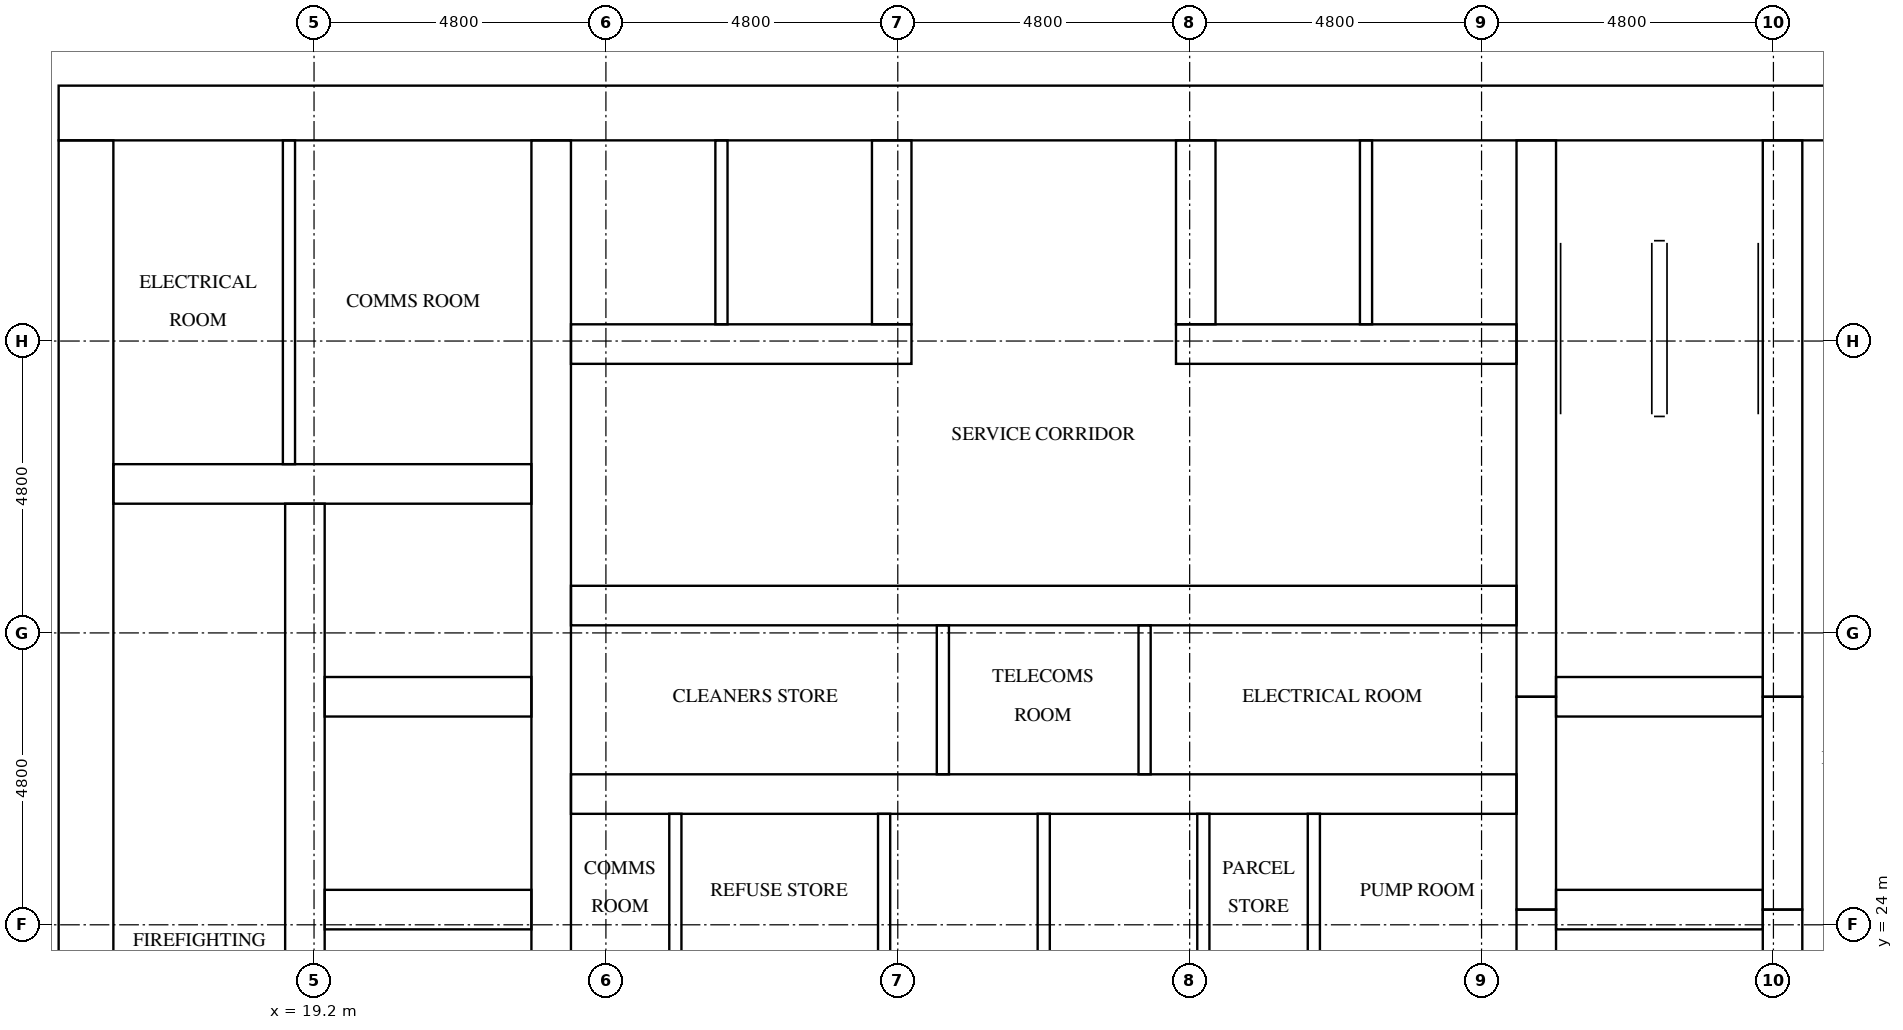
"""IFC4 building model, lengths in metres.
Left out: names, types, materials, properties, quantities, classifications, styles, units other than length and angle.
Written with IfcOpenShell. Run it as: python <this file> out.ifc"""

import sys

from ifc_helpers import new_model, si_unit, direction, frame, frame_2d, origin, place, context, subcontext, project, spatial, rectangle, extrude, element, fill, save


model = new_model("IFC4")
c1 = context("Model", 3, precision=1e-05, world=origin(), true_north=direction((0.0, 1.0)))
c2 = subcontext(c1, "Body", "Model", "MODEL_VIEW")
j1 = project(units=[si_unit("LENGTHUNIT", "METRE"), si_unit("PLANEANGLEUNIT", "RADIAN")], contexts=[c1])
p1 = place(None, origin())
s1 = spatial("IfcSite", under=j1, at=p1, CompositionType="ELEMENT")
p2 = place(p1, origin())
s2 = spatial("IfcBuilding", under=s1, at=p2, CompositionType="ELEMENT")
p3 = place(p2, frame((0.0, 0.0, 99.7)))
s3 = spatial("IfcBuildingStorey", under=s2, at=p3, CompositionType="ELEMENT", Elevation=99.7)
p4 = place(p3, frame((15.0, 37.35, 0.0), z_axis=(0.0, 0.0, 1.0), x_axis=(1.0, 0.0, 0.0)))
e1 = element("IfcWall", 1, at=p4, inside=s3, PredefinedType="SHEAR", context=c2, shape_type="SweptSolid", body=[
    extrude(rectangle(XDim=32.4, YDim=0.9, at=frame_2d((16.2, 0.0))), origin(), (0.0, 0.0, 1.0), 3.2),
])
p5 = place(p4, frame((15.3, 0.0, 0.0)))
e2 = element("IfcOpeningElement", 2, at=p5, cuts=e1, PredefinedType="OPENING", context=c2, shape_type="SweptSolid", body=[
    extrude(rectangle(XDim=1.8, YDim=2.1, at=frame_2d((0.9, 1.05))), frame((0.0, 0.46, 0.0), z_axis=(0.0, -1.0, 0.0), x_axis=(1.0, 0.0, 0.0)), (0.0, 0.0, 1.0), 0.92),
])
p6 = place(p4, frame((1.794, 0.0, 0.0)))
e3 = element("IfcOpeningElement", 3, at=p6, cuts=e1, PredefinedType="OPENING", context=c2, shape_type="SweptSolid", body=[
    extrude(rectangle(XDim=1.0, YDim=2.1, at=frame_2d((0.5, 1.05))), frame((0.0, 0.46, 0.0), z_axis=(0.0, -1.0, 0.0), x_axis=(1.0, 0.0, 0.0)), (0.0, 0.0, 1.0), 0.92),
])
p7 = place(p4, frame((5.331, 0.0, 0.0)))
e4 = element("IfcOpeningElement", 4, at=p7, cuts=e1, PredefinedType="OPENING", context=c2, shape_type="SweptSolid", body=[
    extrude(rectangle(XDim=1.0, YDim=2.1, at=frame_2d((0.5, 1.05))), frame((0.0, 0.46, 0.0), z_axis=(0.0, -1.0, 0.0), x_axis=(1.0, 0.0, 0.0)), (0.0, 0.0, 1.0), 0.92),
])
p8 = place(p3, frame((15.45, 15.9, 0.0), z_axis=(0.0, 0.0, 1.0), x_axis=(0.0, 1.0, 0.0)))
e5 = element("IfcWall", 5, at=p8, inside=s3, PredefinedType="SHEAR", context=c2, shape_type="SweptSolid", body=[
    extrude(rectangle(XDim=21.0, YDim=0.9, at=frame_2d((10.5, 0.0))), origin(), (0.0, 0.0, 1.0), 3.2),
])
p9 = place(p8, frame((4.86, 0.0, 0.0)))
e6 = element("IfcOpeningElement", 6, at=p9, cuts=e5, PredefinedType="OPENING", context=c2, shape_type="SweptSolid", body=[
    extrude(rectangle(XDim=1.2, YDim=2.1, at=frame_2d((0.6, 1.05))), frame((0.0, 0.46, 0.0), z_axis=(0.0, -1.0, 0.0), x_axis=(1.0, 0.0, 0.0)), (0.0, 0.0, 1.0), 0.92),
])
p10 = place(p3, frame((19.05, 15.9, 0.0), z_axis=(0.0, 0.0, 1.0), x_axis=(0.0, 1.0, 0.0)))
e7 = element("IfcWall", 7, at=p10, inside=s3, PredefinedType="SHEAR", context=c2, shape_type="SweptSolid", body=[
    extrude(rectangle(XDim=15.025, YDim=0.65, at=frame_2d((7.513, 0.0))), origin(), (0.0, 0.0, 1.0), 3.2),
])
p11 = place(p10, frame((9.55, 0.0, 0.0)))
e8 = element("IfcOpeningElement", 8, at=p11, cuts=e7, PredefinedType="OPENING", context=c2, shape_type="SweptSolid", body=[
    extrude(rectangle(XDim=1.1, YDim=2.1, at=frame_2d((0.55, 1.05))), frame((0.0, 0.335, 0.0), z_axis=(0.0, -1.0, 0.0), x_axis=(1.0, 0.0, 0.0)), (0.0, 0.0, 1.0), 0.67),
])
p12 = place(p10, frame((13.05, 0.0, 0.0)))
e9 = element("IfcOpeningElement", 9, at=p12, cuts=e7, PredefinedType="OPENING", context=c2, shape_type="SweptSolid", body=[
    extrude(rectangle(XDim=1.1, YDim=2.1, at=frame_2d((0.55, 1.05))), frame((0.0, 0.335, 0.0), z_axis=(0.0, -1.0, 0.0), x_axis=(1.0, 0.0, 0.0)), (0.0, 0.0, 1.0), 0.67),
])
p13 = place(p10, frame((0.3, 0.0, 0.0)))
e10 = element("IfcOpeningElement", 10, at=p13, cuts=e7, PredefinedType="OPENING", context=c2, shape_type="SweptSolid", body=[
    extrude(rectangle(XDim=1.2, YDim=2.1, at=frame_2d((0.6, 1.05))), frame((0.0, 0.335, 0.0), z_axis=(0.0, -1.0, 0.0), x_axis=(1.0, 0.0, 0.0)), (0.0, 0.0, 1.0), 0.67),
])
p14 = place(p3, frame((23.1, 15.9, 0.0), z_axis=(0.0, 0.0, 1.0), x_axis=(0.0, 1.0, 0.0)))
e11 = element("IfcWall", 11, at=p14, inside=s3, PredefinedType="SHEAR", context=c2, shape_type="SweptSolid", body=[
    extrude(rectangle(XDim=21.0, YDim=0.65, at=frame_2d((10.5, 0.0))), origin(), (0.0, 0.0, 1.0), 3.2),
])
p15 = place(p3, frame((39.3, 15.9, 0.0), z_axis=(0.0, 0.0, 1.0), x_axis=(0.0, 1.0, 0.0)))
e12 = element("IfcWall", 12, at=p15, inside=s3, PredefinedType="SHEAR", context=c2, shape_type="SweptSolid", body=[
    extrude(rectangle(XDim=8.35, YDim=0.65, at=frame_2d((4.175, 0.0))), origin(), (0.0, 0.0, 1.0), 3.2),
])
p16 = place(p3, frame((39.3, 24.25, 0.0), z_axis=(0.0, 0.0, 1.0), x_axis=(0.0, 1.0, 0.0)))
e13 = element("IfcWall", 13, at=p16, inside=s3, PredefinedType="SHEAR", context=c2, shape_type="SweptSolid", body=[
    extrude(rectangle(XDim=3.5, YDim=0.65, at=frame_2d((1.75, 0.0))), origin(), (0.0, 0.0, 1.0), 3.2),
])
p17 = place(p3, frame((39.3, 27.75, 0.0), z_axis=(0.0, 0.0, 1.0), x_axis=(0.0, 1.0, 0.0)))
e14 = element("IfcWall", 14, at=p17, inside=s3, PredefinedType="SHEAR", context=c2, shape_type="SweptSolid", body=[
    extrude(rectangle(XDim=9.15, YDim=0.65, at=frame_2d((4.575, 0.0))), origin(), (0.0, 0.0, 1.0), 3.2),
])
p18 = place(p3, frame((43.35, 15.9, 0.0), z_axis=(0.0, 0.0, 1.0), x_axis=(0.0, 1.0, 0.0)))
e15 = element("IfcWall", 15, at=p18, inside=s3, PredefinedType="SHEAR", context=c2, shape_type="SweptSolid", body=[
    extrude(rectangle(XDim=8.35, YDim=0.65, at=frame_2d((4.175, 0.0))), origin(), (0.0, 0.0, 1.0), 3.2),
])
p19 = place(p18, frame((0.3, 0.0, 0.0)))
e16 = element("IfcOpeningElement", 16, at=p19, cuts=e15, PredefinedType="OPENING", context=c2, shape_type="SweptSolid", body=[
    extrude(rectangle(XDim=1.2, YDim=2.1, at=frame_2d((0.6, 1.05))), frame((0.0, 0.335, 0.0), z_axis=(0.0, -1.0, 0.0), x_axis=(1.0, 0.0, 0.0)), (0.0, 0.0, 1.0), 0.67),
])
p20 = place(p3, frame((43.35, 24.25, 0.0), z_axis=(0.0, 0.0, 1.0), x_axis=(0.0, 1.0, 0.0)))
e17 = element("IfcWall", 17, at=p20, inside=s3, PredefinedType="SHEAR", context=c2, shape_type="SweptSolid", body=[
    extrude(rectangle(XDim=3.5, YDim=0.65, at=frame_2d((1.75, 0.0))), origin(), (0.0, 0.0, 1.0), 3.2),
])
p21 = place(p20, frame((1.2, 0.0, 0.0)))
e18 = element("IfcOpeningElement", 18, at=p21, cuts=e17, PredefinedType="OPENING", context=c2, shape_type="SweptSolid", body=[
    extrude(rectangle(XDim=1.1, YDim=2.1, at=frame_2d((0.55, 1.05))), frame((0.0, 0.335, 0.0), z_axis=(0.0, -1.0, 0.0), x_axis=(1.0, 0.0, 0.0)), (0.0, 0.0, 1.0), 0.67),
])
p22 = place(p3, frame((43.35, 27.75, 0.0), z_axis=(0.0, 0.0, 1.0), x_axis=(0.0, 1.0, 0.0)))
e19 = element("IfcWall", 19, at=p22, inside=s3, PredefinedType="SHEAR", context=c2, shape_type="SweptSolid", body=[
    extrude(rectangle(XDim=9.15, YDim=0.65, at=frame_2d((4.575, 0.0))), origin(), (0.0, 0.0, 1.0), 3.2),
])
p23 = place(p22, frame((7.65, 0.0, 0.0)))
e20 = element("IfcOpeningElement", 20, at=p23, cuts=e19, PredefinedType="OPENING", context=c2, shape_type="SweptSolid", body=[
    extrude(rectangle(XDim=1.2, YDim=2.1, at=frame_2d((0.6, 1.05))), frame((0.0, 0.335, 0.0), z_axis=(0.0, -1.0, 0.0), x_axis=(1.0, 0.0, 0.0)), (0.0, 0.0, 1.0), 0.67),
])
for number, where, z_axis, x_axis in (
    (21, (19.375, 24.25, 0.0), (0.0, 0.0, 1.0), (1.0, 0.0, 0.0)),
    (22, (19.375, 27.75, 0.0), (0.0, 0.0, 1.0), (1.0, 0.0, 0.0)),
):
    element("IfcWall", number, at=place(p3, frame(where, z_axis=z_axis, x_axis=x_axis)), inside=s3, PredefinedType="SHEAR", context=c2, shape_type="SweptSolid", body=[
        extrude(rectangle(XDim=3.4, YDim=0.65, at=frame_2d((1.7, 0.0))), origin(), (0.0, 0.0, 1.0), 3.2),
    ])
p24 = place(p3, frame((15.9, 31.25, 0.0), z_axis=(0.0, 0.0, 1.0), x_axis=(1.0, 0.0, 0.0)))
e23 = element("IfcWall", 23, at=p24, inside=s3, PredefinedType="SHEAR", context=c2, shape_type="SweptSolid", body=[
    extrude(rectangle(XDim=6.875, YDim=0.65, at=frame_2d((3.438, 0.0))), origin(), (0.0, 0.0, 1.0), 3.2),
])
for number, where, z_axis, x_axis in (
    (24, (39.625, 24.25, 0.0), (0.0, 0.0, 1.0), (1.0, 0.0, 0.0)),
    (25, (39.625, 27.75, 0.0), (0.0, 0.0, 1.0), (1.0, 0.0, 0.0)),
):
    element("IfcWall", number, at=place(p3, frame(where, z_axis=z_axis, x_axis=x_axis)), inside=s3, PredefinedType="SHEAR", context=c2, shape_type="SweptSolid", body=[
        extrude(rectangle(XDim=3.4, YDim=0.65, at=frame_2d((1.7, 0.0))), origin(), (0.0, 0.0, 1.0), 3.2),
    ])
p25 = place(p3, frame((23.425, 26.15, 0.0), z_axis=(0.0, 0.0, 1.0), x_axis=(1.0, 0.0, 0.0)))
e26 = element("IfcWall", 26, at=p25, inside=s3, PredefinedType="SHEAR", context=c2, shape_type="SweptSolid", body=[
    extrude(rectangle(XDim=15.55, YDim=0.65, at=frame_2d((7.775, 0.0))), origin(), (0.0, 0.0, 1.0), 3.2),
])
p26 = place(p3, frame((23.425, 29.25, 0.0), z_axis=(0.0, 0.0, 1.0), x_axis=(1.0, 0.0, 0.0)))
e27 = element("IfcWall", 27, at=p26, inside=s3, PredefinedType="SHEAR", context=c2, shape_type="SweptSolid", body=[
    extrude(rectangle(XDim=15.55, YDim=0.65, at=frame_2d((7.775, 0.0))), origin(), (0.0, 0.0, 1.0), 3.2),
])
p27 = place(p26, frame((2.508, 0.0, 0.0)))
e28 = element("IfcOpeningElement", 28, at=p27, cuts=e27, PredefinedType="OPENING", context=c2, shape_type="SweptSolid", body=[
    extrude(rectangle(XDim=1.0, YDim=2.1, at=frame_2d((0.5, 1.05))), frame((0.0, 0.335, 0.0), z_axis=(0.0, -1.0, 0.0), x_axis=(1.0, 0.0, 0.0)), (0.0, 0.0, 1.0), 0.67),
])
p28 = place(p26, frame((7.275, 0.0, 0.0)))
e29 = element("IfcOpeningElement", 29, at=p28, cuts=e27, PredefinedType="OPENING", context=c2, shape_type="SweptSolid", body=[
    extrude(rectangle(XDim=1.0, YDim=2.1, at=frame_2d((0.5, 1.05))), frame((0.0, 0.335, 0.0), z_axis=(0.0, -1.0, 0.0), x_axis=(1.0, 0.0, 0.0)), (0.0, 0.0, 1.0), 0.67),
])
p29 = place(p26, frame((12.042, 0.0, 0.0)))
e30 = element("IfcOpeningElement", 30, at=p29, cuts=e27, PredefinedType="OPENING", context=c2, shape_type="SweptSolid", body=[
    extrude(rectangle(XDim=1.0, YDim=2.1, at=frame_2d((0.5, 1.05))), frame((0.0, 0.335, 0.0), z_axis=(0.0, -1.0, 0.0), x_axis=(1.0, 0.0, 0.0)), (0.0, 0.0, 1.0), 0.67),
])
p30 = place(p3, frame((23.425, 33.55, 0.0), z_axis=(0.0, 0.0, 1.0), x_axis=(1.0, 0.0, 0.0)))
e31 = element("IfcWall", 31, at=p30, inside=s3, PredefinedType="SHEAR", context=c2, shape_type="SweptSolid", body=[
    extrude(rectangle(XDim=5.6, YDim=0.65, at=frame_2d((2.8, 0.0))), origin(), (0.0, 0.0, 1.0), 3.2),
])
p31 = place(p3, frame((33.375, 33.55, 0.0), z_axis=(0.0, 0.0, 1.0), x_axis=(1.0, 0.0, 0.0)))
e32 = element("IfcWall", 32, at=p31, inside=s3, PredefinedType="SHEAR", context=c2, shape_type="SweptSolid", body=[
    extrude(rectangle(XDim=5.6, YDim=0.65, at=frame_2d((2.8, 0.0))), origin(), (0.0, 0.0, 1.0), 3.2),
])
for number, where, z_axis, x_axis in (
    (33, (28.7, 33.875, 0.0), (0.0, 0.0, 1.0), (0.0, 1.0, 0.0)),
    (34, (33.7, 33.875, 0.0), (0.0, 0.0, 1.0), (0.0, 1.0, 0.0)),
):
    element("IfcWall", number, at=place(p3, frame(where, z_axis=z_axis, x_axis=x_axis)), inside=s3, PredefinedType="SHEAR", context=c2, shape_type="SweptSolid", body=[
        extrude(rectangle(XDim=3.025, YDim=0.65, at=frame_2d((1.512, 0.0))), origin(), (0.0, 0.0, 1.0), 3.2),
    ])
for number, where, z_axis, x_axis in (
    (35, (28.575, 23.375, 0.0), (0.0, 0.0, 1.0), (0.0, 1.0, 0.0)),
    (36, (31.2, 23.375, 0.0), (0.0, 0.0, 1.0), (0.0, 1.0, 0.0)),
    (37, (33.825, 23.375, 0.0), (0.0, 0.0, 1.0), (0.0, 1.0, 0.0)),
):
    element("IfcWall", number, at=place(p3, frame(where, z_axis=z_axis, x_axis=x_axis)), inside=s3, PredefinedType="SOLIDWALL", context=c2, shape_type="SweptSolid", body=[
        extrude(rectangle(XDim=2.45, YDim=0.2, at=frame_2d((1.225, 0.0))), origin(), (0.0, 0.0, 1.0), 3.2),
    ])
for number, where, z_axis, x_axis in (
    (38, (25.9, 33.875, 0.0), (0.0, 0.0, 1.0), (0.0, 1.0, 0.0)),
    (39, (36.5, 33.875, 0.0), (0.0, 0.0, 1.0), (0.0, 1.0, 0.0)),
):
    element("IfcWall", number, at=place(p3, frame(where, z_axis=z_axis, x_axis=x_axis)), inside=s3, PredefinedType="SOLIDWALL", context=c2, shape_type="SweptSolid", body=[
        extrude(rectangle(XDim=3.025, YDim=0.2, at=frame_2d((1.512, 0.0))), origin(), (0.0, 0.0, 1.0), 3.2),
    ])
p32 = place(p3, frame((18.788, 31.575, 0.0), z_axis=(0.0, 0.0, 1.0), x_axis=(0.0, 1.0, 0.0)))
e40 = element("IfcWall", 40, at=p32, inside=s3, PredefinedType="PARTITIONING", context=c2, shape_type="SweptSolid", body=[
    extrude(rectangle(XDim=5.325, YDim=0.2, at=frame_2d((2.663, 0.0))), origin(), (0.0, 0.0, 1.0), 3.2),
])
for number, where, z_axis, x_axis in (
    (41, (25.142, 23.375, 0.0), (0.0, 0.0, 1.0), (0.0, 1.0, 0.0)),
    (42, (35.642, 23.375, 0.0), (0.0, 0.0, 1.0), (0.0, 1.0, 0.0)),
    (43, (29.541, 26.475, 0.0), (0.0, 0.0, 1.0), (0.0, 1.0, 0.0)),
    (44, (32.859, 26.475, 0.0), (0.0, 0.0, 1.0), (0.0, 1.0, 0.0)),
):
    element("IfcWall", number, at=place(p3, frame(where, z_axis=z_axis, x_axis=x_axis)), inside=s3, PredefinedType="PARTITIONING", context=c2, shape_type="SweptSolid", body=[
        extrude(rectangle(XDim=2.45, YDim=0.2, at=frame_2d((1.225, 0.0))), origin(), (0.0, 0.0, 1.0), 3.2),
    ])
p33 = place(p11, origin())
e45 = element("IfcDoor", 45, at=p33, inside=s3, OperationType="DOUBLE_DOOR_SLIDING", PredefinedType="DOOR", context=c2, shape_type="SweptSolid", body=[
    extrude(rectangle(XDim=1.1, YDim=2.1, at=frame_2d((0.55, 1.05))), frame((0.0, 0.025, 0.0), z_axis=(0.0, -1.0, 0.0), x_axis=(1.0, 0.0, 0.0)), (0.0, 0.0, 1.0), 0.05),
])
fill(e8, e45)
p34 = place(p12, origin())
e46 = element("IfcDoor", 46, at=p34, inside=s3, OperationType="DOUBLE_DOOR_SLIDING", PredefinedType="DOOR", context=c2, shape_type="SweptSolid", body=[
    extrude(rectangle(XDim=1.1, YDim=2.1, at=frame_2d((0.55, 1.05))), frame((0.0, 0.025, 0.0), z_axis=(0.0, -1.0, 0.0), x_axis=(1.0, 0.0, 0.0)), (0.0, 0.0, 1.0), 0.05),
])
fill(e9, e46)
p35 = place(p21, origin())
e47 = element("IfcDoor", 47, at=p35, inside=s3, OperationType="DOUBLE_DOOR_SLIDING", PredefinedType="DOOR", context=c2, shape_type="SweptSolid", body=[
    extrude(rectangle(XDim=1.1, YDim=2.1, at=frame_2d((0.55, 1.05))), frame((0.0, 0.025, 0.0), z_axis=(0.0, -1.0, 0.0), x_axis=(1.0, 0.0, 0.0)), (0.0, 0.0, 1.0), 0.05),
])
fill(e18, e47)
p36 = place(p23, origin())
e48 = element("IfcDoor", 48, at=p36, inside=s3, OperationType="SINGLE_SWING_LEFT", PredefinedType="DOOR", context=c2, shape_type="SweptSolid", body=[
    extrude(rectangle(XDim=1.2, YDim=2.1, at=frame_2d((0.6, 1.05))), frame((0.0, 0.025, 0.0), z_axis=(0.0, -1.0, 0.0), x_axis=(1.0, 0.0, 0.0)), (0.0, 0.0, 1.0), 0.05),
])
fill(e20, e48)
p37 = place(p5, origin())
e49 = element("IfcDoor", 49, at=p37, inside=s3, OperationType="DOUBLE_DOOR_SINGLE_SWING", PredefinedType="DOOR", context=c2, shape_type="SweptSolid", body=[
    extrude(rectangle(XDim=1.8, YDim=2.1, at=frame_2d((0.9, 1.05))), frame((0.0, 0.025, 0.0), z_axis=(0.0, -1.0, 0.0), x_axis=(1.0, 0.0, 0.0)), (0.0, 0.0, 1.0), 0.05),
])
fill(e2, e49)
p38 = place(p6, origin())
e50 = element("IfcDoor", 50, at=p38, inside=s3, OperationType="SINGLE_SWING_RIGHT", PredefinedType="DOOR", context=c2, shape_type="SweptSolid", body=[
    extrude(rectangle(XDim=1.0, YDim=2.1, at=frame_2d((0.5, 1.05))), frame((0.0, 0.025, 0.0), z_axis=(0.0, -1.0, 0.0), x_axis=(1.0, 0.0, 0.0)), (0.0, 0.0, 1.0), 0.05),
])
fill(e3, e50)
p39 = place(p7, origin())
e51 = element("IfcDoor", 51, at=p39, inside=s3, OperationType="SINGLE_SWING_LEFT", PredefinedType="DOOR", context=c2, shape_type="SweptSolid", body=[
    extrude(rectangle(XDim=1.0, YDim=2.1, at=frame_2d((0.5, 1.05))), frame((0.0, 0.025, 0.0), z_axis=(0.0, -1.0, 0.0), x_axis=(1.0, 0.0, 0.0)), (0.0, 0.0, 1.0), 0.05),
])
fill(e4, e51)
p40 = place(p27, origin())
e52 = element("IfcDoor", 52, at=p40, inside=s3, OperationType="SINGLE_SWING_RIGHT", PredefinedType="DOOR", context=c2, shape_type="SweptSolid", body=[
    extrude(rectangle(XDim=1.0, YDim=2.1, at=frame_2d((0.5, 1.05))), frame((0.0, 0.025, 0.0), z_axis=(0.0, -1.0, 0.0), x_axis=(1.0, 0.0, 0.0)), (0.0, 0.0, 1.0), 0.05),
])
fill(e28, e52)
p41 = place(p28, origin())
e53 = element("IfcDoor", 53, at=p41, inside=s3, OperationType="SINGLE_SWING_LEFT", PredefinedType="DOOR", context=c2, shape_type="SweptSolid", body=[
    extrude(rectangle(XDim=1.0, YDim=2.1, at=frame_2d((0.5, 1.05))), frame((0.0, 0.025, 0.0), z_axis=(0.0, -1.0, 0.0), x_axis=(1.0, 0.0, 0.0)), (0.0, 0.0, 1.0), 0.05),
])
fill(e29, e53)
p42 = place(p29, origin())
e54 = element("IfcDoor", 54, at=p42, inside=s3, OperationType="SINGLE_SWING_RIGHT", PredefinedType="DOOR", context=c2, shape_type="SweptSolid", body=[
    extrude(rectangle(XDim=1.0, YDim=2.1, at=frame_2d((0.5, 1.05))), frame((0.0, 0.025, 0.0), z_axis=(0.0, -1.0, 0.0), x_axis=(1.0, 0.0, 0.0)), (0.0, 0.0, 1.0), 0.05),
])
fill(e30, e54)
save(model, sys.argv[1])
